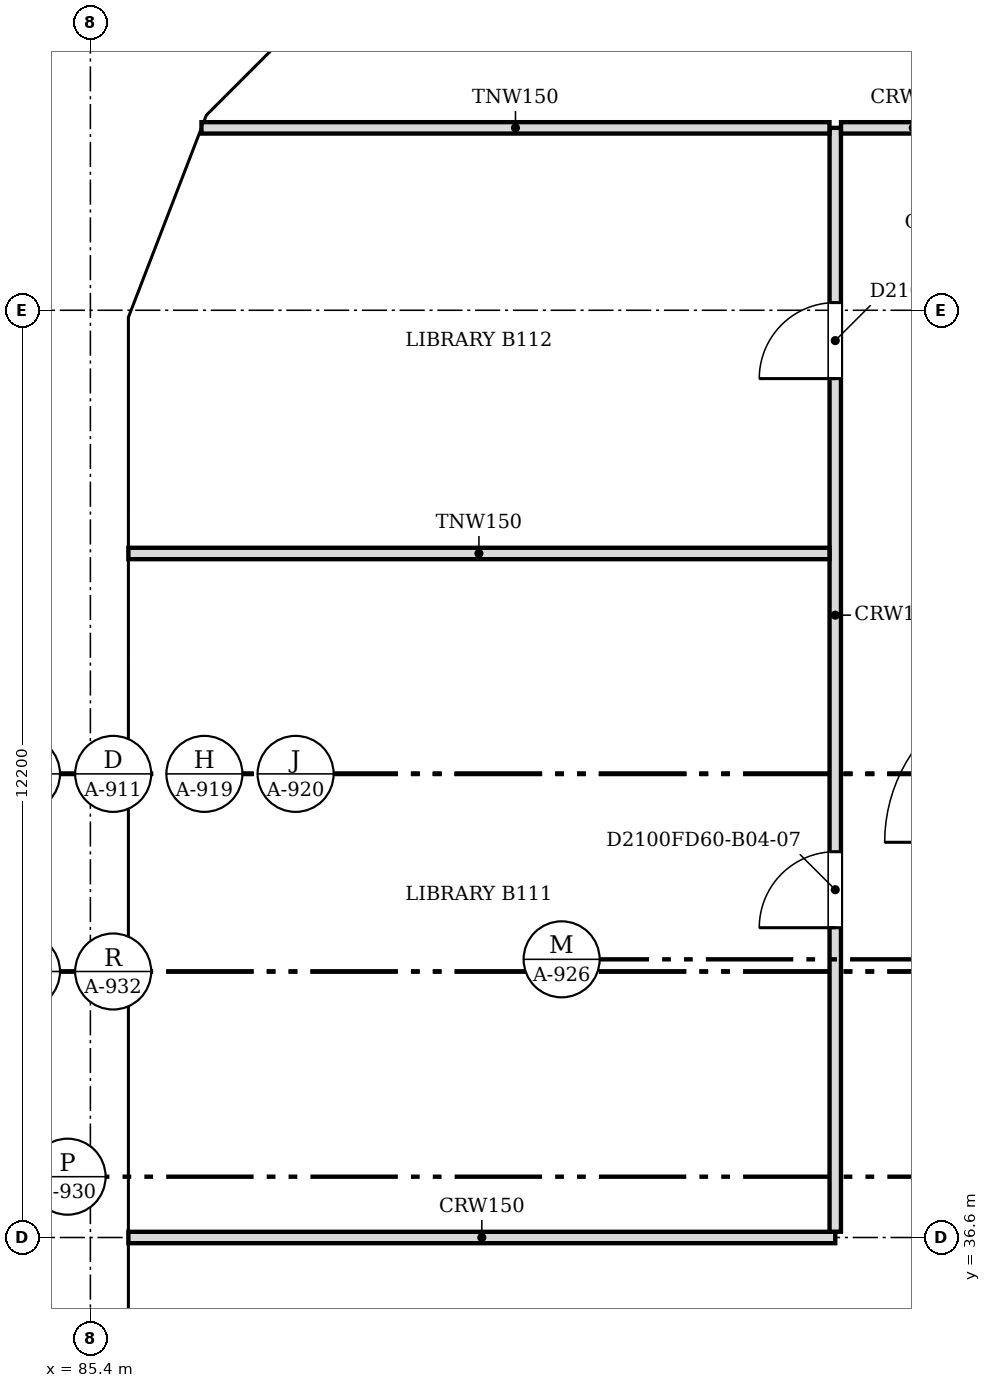
"""IFC4 building model, lengths in metres.
Left out: names, types, materials, properties, quantities, classifications, styles, units other than length and angle.
Written with IfcOpenShell. Run it as: python <this file> out.ifc"""

import sys

from ifc_helpers import new_model, si_unit, direction, frame, frame_2d, origin, place, context, subcontext, project, spatial, polyline, rectangle, outline, extrude, faceted_brep, source, transform, mapped, element, fill, save


model = new_model("IFC4")
c1 = context("Model", 3, precision=1e-05, world=origin(), true_north=direction((0.0, 1.0)))
c2 = subcontext(c1, "Body", "Model", "MODEL_VIEW")
j1 = project(units=[si_unit("LENGTHUNIT", "METRE"), si_unit("PLANEANGLEUNIT", "RADIAN")], contexts=[c1])
p1 = place(None, origin())
s1 = spatial("IfcSite", under=j1, at=p1, CompositionType="ELEMENT")
p2 = place(p1, origin())
s2 = spatial("IfcBuilding", under=s1, at=p2, CompositionType="ELEMENT")
p3 = place(p2, frame((0.0, 0.0, 41.0)))
s3 = spatial("IfcBuildingStorey", under=s2, at=p3, CompositionType="ELEMENT", Elevation=41.0)
m1 = source(origin(), c2, "Body", "Brep", [
    faceted_brep([(2.944, -0.25, 0.0), (2.997, -0.25, 0.068), (2.997, -0.25, 7.532), (2.944, -0.25, 7.6), (0.0, -0.25, 3.8), (0.053, 0.25, 3.868), (2.891, 0.25, 7.532), (2.891, 0.25, 0.068), (0.053, 0.25, 3.732), (2.944, 0.0, 0.0), (2.944, 0.0, 7.6), (0.0, 0.0, 3.8)], [[[0, 1, 2, 3, 4]], [[5, 6, 7, 8]], [[1, 0, 9]], [[10, 3, 2]], [[6, 5, 11, 4, 3, 10]], [[8, 7, 9, 0, 4, 11]], [[8, 11, 5]], [[1, 9, 7, 6, 10, 2]]]),
])
p4 = place(p3, frame((88.794, 53.588, -3.8), z_axis=(0.0, 0.0, 1.0), x_axis=(-0.707066050402, -0.707147509625, 0.0)))
e1 = element("IfcWall", 1, at=p4, inside=s3, PredefinedType="SOLIDWALL", context=c2, shape_type="MappedRepresentation", body=[
    mapped(m1, transform((0.0, 0.0, 0.0), scale=1.0)),
])
m2 = source(origin(), c2, "Body", "SweptSolid", [
    extrude(outline(polyline([(2.744, 6.934), (0.316, 3.8), (2.744, 0.666), (2.744, 6.934)])), frame((0.0, 0.26, 0.0), z_axis=(0.0, -1.0, 0.0), x_axis=(1.0, 0.0, 0.0)), (0.0, 0.0, 1.0), 0.52),
])
p5 = place(p4, origin())
e2 = element("IfcOpeningElement", 2, at=p5, cuts=e1, PredefinedType="OPENING", context=c2, shape_type="MappedRepresentation", body=[
    mapped(m2, transform((0.0, 0.0, 0.0), scale=1.0)),
])
m3 = source(origin(), c2, "Body", "Brep", [
    faceted_brep([(0.053, -0.25, 0.0), (3.003, -0.25, 3.8), (0.053, -0.25, 7.6), (0.0, -0.25, 7.532), (0.0, -0.25, 0.068), (0.106, 0.25, 7.532), (2.957, 0.25, 3.86), (2.957, 0.25, 3.74), (0.106, 0.25, 0.068), (3.003, 0.0, 3.8), (0.053, 0.0, 0.0), (0.053, 0.0, 7.6)], [[[0, 1, 2, 3, 4]], [[5, 6, 7, 8]], [[8, 7, 9, 1, 0, 10]], [[6, 5, 11, 2, 1, 9]], [[3, 2, 11]], [[10, 0, 4]], [[8, 10, 4, 3, 11, 5]], [[9, 7, 6]]]),
])
p6 = place(p3, frame((86.731, 51.556, -3.8), z_axis=(0.0, 0.0, 1.0), x_axis=(-0.359855894603, -0.933007896601, 0.0)))
e3 = element("IfcWall", 3, at=p6, inside=s3, PredefinedType="SOLIDWALL", context=c2, shape_type="MappedRepresentation", body=[
    mapped(m3, transform((0.0, 0.0, 0.0), scale=1.0)),
])
m4 = source(origin(), c2, "Body", "SweptSolid", [
    extrude(outline(polyline([(0.253, 0.665), (2.687, 3.8), (0.253, 6.935), (0.253, 0.665)])), frame((0.0, 0.26, 0.0), z_axis=(0.0, -1.0, 0.0), x_axis=(1.0, 0.0, 0.0)), (0.0, 0.0, 1.0), 0.52),
])
p7 = place(p6, origin())
e4 = element("IfcOpeningElement", 4, at=p7, cuts=e3, PredefinedType="OPENING", context=c2, shape_type="MappedRepresentation", body=[
    mapped(m4, transform((0.0, 0.0, 0.0), scale=1.0)),
])
m5 = source(origin(), c2, "Body", "Brep", [
    faceted_brep([(3.003, -0.25, 0.0), (6.053, -0.25, 3.8), (3.003, -0.25, 7.6), (0.0, -0.25, 3.8), (0.047, 0.25, 3.859), (3.003, 0.25, 7.6), (6.053, 0.25, 3.8), (3.003, 0.25, 0.0), (0.047, 0.25, 3.741), (0.0, 0.0, 3.8)], [[[0, 1, 2, 3]], [[4, 5, 6, 7, 8]], [[7, 6, 1, 0]], [[6, 5, 2, 1]], [[5, 4, 9, 3, 2]], [[8, 7, 0, 3, 9]], [[8, 9, 4]]]),
])
p8 = place(p3, frame((85.65, 48.753, -3.8), z_axis=(0.0, 0.0, 1.0), x_axis=(0.0, -1.0, 0.0)))
e5 = element("IfcWall", 5, at=p8, inside=s3, PredefinedType="SOLIDWALL", context=c2, shape_type="MappedRepresentation", body=[
    mapped(m5, transform((0.0, 0.0, 0.0), scale=1.0)),
])
m6 = source(origin(), c2, "Body", "SweptSolid", [
    extrude(outline(polyline([(3.005, 0.401), (5.733, 3.8), (3.005, 7.199), (0.319, 3.8), (3.005, 0.401)])), frame((0.0, 0.26, 0.0), z_axis=(0.0, -1.0, 0.0), x_axis=(1.0, 0.0, 0.0)), (0.0, 0.0, 1.0), 0.52),
])
p9 = place(p8, origin())
e6 = element("IfcOpeningElement", 6, at=p9, cuts=e5, PredefinedType="OPENING", context=c2, shape_type="MappedRepresentation", body=[
    mapped(m6, transform((0.0, 0.0, 0.0), scale=1.0)),
])
m7 = source(origin(), c2, "Body", "Brep", [
    faceted_brep([(3.05, -0.25, 0.0), (6.1, -0.25, 3.8), (6.1, -0.25, 3.8), (3.05, -0.25, 7.6), (0.0, -0.25, 3.8), (0.0, 0.25, 3.8), (3.05, 0.25, 7.6), (6.1, 0.25, 3.8), (6.1, 0.25, 3.8), (3.05, 0.25, 0.0)], [[[0, 1, 2, 3, 4]], [[5, 6, 7, 8, 9]], [[9, 8, 1, 0]], [[7, 6, 3, 2]], [[6, 5, 4, 3]], [[5, 9, 0, 4]], [[1, 8, 7, 2]]]),
])
p10 = place(p3, frame((85.65, 42.7, -3.8), z_axis=(0.0, 0.0, 1.0), x_axis=(0.0, -1.0, 0.0)))
e7 = element("IfcWall", 7, at=p10, inside=s3, PredefinedType="SOLIDWALL", context=c2, shape_type="MappedRepresentation", body=[
    mapped(m7, transform((0.0, 0.0, 0.0), scale=1.0)),
])
m8 = source(origin(), c2, "Body", "SweptSolid", [
    extrude(outline(polyline([(3.05, 0.399), (5.78, 3.8), (3.05, 7.201), (0.321, 3.8), (3.05, 0.399)])), frame((0.0, 0.26, 0.0), z_axis=(0.0, -1.0, 0.0), x_axis=(1.0, 0.0, 0.0)), (0.0, 0.0, 1.0), 0.52),
])
p11 = place(p10, origin())
e8 = element("IfcOpeningElement", 8, at=p11, cuts=e7, PredefinedType="OPENING", context=c2, shape_type="MappedRepresentation", body=[
    mapped(m8, transform((0.0, 0.0, 0.0), scale=1.0)),
])
m9 = source(origin(), c2, "Body", "SweptSolid", [
    extrude(outline(polyline([(3.05, 0.0), (6.1, 3.8), (3.05, 7.6), (0.0, 3.8), (3.05, 0.0)])), frame((0.0, 0.25, 0.0), z_axis=(0.0, -1.0, 0.0), x_axis=(1.0, 0.0, 0.0)), (0.0, 0.0, 1.0), 0.5),
])
p12 = place(p3, frame((85.65, 36.6, -3.8), z_axis=(0.0, 0.0, 1.0), x_axis=(0.0, -1.0, 0.0)))
e9 = element("IfcWall", 9, at=p12, inside=s3, PredefinedType="SOLIDWALL", context=c2, shape_type="MappedRepresentation", body=[
    mapped(m9, transform((0.0, 0.0, 0.0), scale=1.0)),
])
p13 = place(p12, origin())
e10 = element("IfcOpeningElement", 10, at=p13, cuts=e9, PredefinedType="OPENING", context=c2, shape_type="MappedRepresentation", body=[
    mapped(m8, transform((0.0, 0.0, 0.0), scale=1.0)),
])
p14 = place(p2, frame((0.0, 0.0, 44.8)))
s4 = spatial("IfcBuildingStorey", under=s2, at=p14, CompositionType="ELEMENT", Elevation=44.8)
m10 = source(origin(), c2, "Body", "Brep", [
    faceted_brep([(0.053, -0.25, 0.0), (2.997, -0.25, 3.8), (0.053, -0.25, 7.6), (0.0, -0.25, 7.532), (0.0, -0.25, 0.068), (0.106, 0.25, 7.532), (2.944, 0.25, 3.868), (2.944, 0.25, 3.732), (0.106, 0.25, 0.068), (2.997, 0.0, 3.8), (0.053, 0.0, 0.0), (0.053, 0.0, 7.6)], [[[0, 1, 2, 3, 4]], [[5, 6, 7, 8]], [[8, 7, 9, 1, 0, 10]], [[6, 5, 11, 2, 1, 9]], [[3, 2, 11]], [[10, 0, 4]], [[8, 10, 4, 3, 11, 5]], [[9, 7, 6]]]),
])
p15 = place(p14, frame((88.831, 53.625, -3.8), z_axis=(0.0, 0.0, 1.0), x_axis=(-0.707147509625, -0.707066050402, 0.0)))
e11 = element("IfcWall", 11, at=p15, inside=s4, PredefinedType="SOLIDWALL", context=c2, shape_type="MappedRepresentation", body=[
    mapped(m10, transform((0.0, 0.0, 0.0), scale=1.0)),
])
m11 = source(origin(), c2, "Body", "SweptSolid", [
    extrude(outline(polyline([(0.253, 0.666), (2.681, 3.8), (0.253, 6.934), (0.253, 0.666)])), frame((0.0, 0.26, 0.0), z_axis=(0.0, -1.0, 0.0), x_axis=(1.0, 0.0, 0.0)), (0.0, 0.0, 1.0), 0.52),
])
p16 = place(p15, origin())
e12 = element("IfcOpeningElement", 12, at=p16, cuts=e11, PredefinedType="OPENING", context=c2, shape_type="MappedRepresentation", body=[
    mapped(m11, transform((0.0, 0.0, 0.0), scale=1.0)),
])
m12 = source(origin(), c2, "Body", "Brep", [
    faceted_brep([(2.95, -0.25, 0.0), (2.997, -0.25, 0.059), (2.997, -0.25, 7.541), (2.95, -0.25, 7.6), (0.0, -0.25, 3.8), (0.053, 0.25, 3.868), (2.904, 0.25, 7.54), (2.904, 0.25, 0.06), (0.053, 0.25, 3.732), (2.95, 0.0, 0.0), (2.95, 0.0, 7.6), (0.0, 0.0, 3.8)], [[[0, 1, 2, 3, 4]], [[5, 6, 7, 8]], [[1, 0, 9]], [[10, 3, 2]], [[6, 5, 11, 4, 3, 10]], [[8, 7, 9, 0, 4, 11]], [[8, 11, 5]], [[1, 9, 7, 6, 10, 2]]]),
])
p17 = place(p14, frame((86.712, 51.506, -3.8), z_axis=(0.0, 0.0, 1.0), x_axis=(-0.359874094142, -0.933000876937, 0.0)))
e13 = element("IfcWall", 13, at=p17, inside=s4, PredefinedType="SOLIDWALL", context=c2, shape_type="MappedRepresentation", body=[
    mapped(m12, transform((0.0, 0.0, 0.0), scale=1.0)),
])
m13 = source(origin(), c2, "Body", "SweptSolid", [
    extrude(outline(polyline([(2.75, 6.935), (0.316, 3.8), (2.75, 0.665), (2.75, 6.935)])), frame((0.0, 0.26, 0.0), z_axis=(0.0, -1.0, 0.0), x_axis=(1.0, 0.0, 0.0)), (0.0, 0.0, 1.0), 0.52),
])
p18 = place(p17, origin())
e14 = element("IfcOpeningElement", 14, at=p18, cuts=e13, PredefinedType="OPENING", context=c2, shape_type="MappedRepresentation", body=[
    mapped(m13, transform((0.0, 0.0, 0.0), scale=1.0)),
])
m14 = source(origin(), c2, "Body", "Brep", [
    faceted_brep([(0.047, -0.25, 0.0), (3.05, -0.25, 3.8), (0.047, -0.25, 7.6), (0.0, -0.25, 7.54), (0.0, -0.25, 0.06), (0.093, 0.25, 7.541), (3.05, 0.25, 3.8), (0.093, 0.25, 0.059), (0.047, 0.0, 0.0), (0.047, 0.0, 7.6)], [[[0, 1, 2, 3, 4]], [[5, 6, 7]], [[7, 6, 1, 0, 8]], [[6, 5, 9, 2, 1]], [[3, 2, 9]], [[8, 0, 4]], [[7, 8, 4, 3, 9, 5]]]),
])
p19 = place(p14, frame((85.65, 48.8, -3.8), z_axis=(0.0, 0.0, 1.0), x_axis=(0.0, -1.0, 0.0)))
e15 = element("IfcWall", 15, at=p19, inside=s4, PredefinedType="SOLIDWALL", context=c2, shape_type="MappedRepresentation", body=[
    mapped(m14, transform((0.0, 0.0, 0.0), scale=1.0)),
])
m15 = source(origin(), c2, "Body", "SweptSolid", [
    extrude(outline(polyline([(0.247, 0.656), (2.731, 3.8), (0.247, 6.944), (0.247, 0.656)])), frame((0.0, 0.26, 0.0), z_axis=(0.0, -1.0, 0.0), x_axis=(1.0, 0.0, 0.0)), (0.0, 0.0, 1.0), 0.52),
])
p20 = place(p19, origin())
e16 = element("IfcOpeningElement", 16, at=p20, cuts=e15, PredefinedType="OPENING", context=c2, shape_type="MappedRepresentation", body=[
    mapped(m15, transform((0.0, 0.0, 0.0), scale=1.0)),
])
p21 = place(p14, frame((85.65, 45.75, -3.8), z_axis=(0.0, 0.0, 1.0), x_axis=(0.0, -1.0, 0.0)))
e17 = element("IfcWall", 17, at=p21, inside=s4, PredefinedType="SOLIDWALL", context=c2, shape_type="MappedRepresentation", body=[
    mapped(m9, transform((0.0, 0.0, 0.0), scale=1.0)),
])
p22 = place(p21, origin())
e18 = element("IfcOpeningElement", 18, at=p22, cuts=e17, PredefinedType="OPENING", context=c2, shape_type="MappedRepresentation", body=[
    mapped(m8, transform((0.0, 0.0, 0.0), scale=1.0)),
])
p23 = place(p14, frame((85.65, 39.65, -3.8), z_axis=(0.0, 0.0, 1.0), x_axis=(0.0, -1.0, 0.0)))
e19 = element("IfcWall", 19, at=p23, inside=s4, PredefinedType="SOLIDWALL", context=c2, shape_type="MappedRepresentation", body=[
    mapped(m7, transform((0.0, 0.0, 0.0), scale=1.0)),
])
p24 = place(p23, origin())
e20 = element("IfcOpeningElement", 20, at=p24, cuts=e19, PredefinedType="OPENING", context=c2, shape_type="MappedRepresentation", body=[
    mapped(m8, transform((0.0, 0.0, 0.0), scale=1.0)),
])
p25 = place(p3, frame((85.9, 36.6, 0.0), z_axis=(0.0, 0.0, 1.0), x_axis=(1.0, 0.0, 0.0)))
e21 = element("IfcWall", 21, at=p25, inside=s3, PredefinedType="PARTITIONING", context=c2, shape_type="SweptSolid", body=[
    extrude(rectangle(XDim=9.3, YDim=0.15, at=frame_2d((4.65, 0.0))), origin(), (0.0, 0.0, 1.0), 3.067),
])
p26 = place(p3, frame((95.2, 36.676, 0.0), z_axis=(0.0, 0.0, 1.0), x_axis=(0.0, 1.0, 0.0)))
e22 = element("IfcWall", 22, at=p26, inside=s3, PredefinedType="PARTITIONING", context=c2, shape_type="SweptSolid", body=[
    extrude(rectangle(XDim=14.524, YDim=0.15, at=frame_2d((7.262, 0.0))), origin(), (0.0, 0.0, 1.0), 3.067),
])
m16 = source(origin(), c2, "Body", "SweptSolid", [
    extrude(rectangle(XDim=1.0, YDim=2.1, at=frame_2d((0.5, 1.05))), frame((0.0, 0.085, 0.0), z_axis=(0.0, -1.0, 0.0), x_axis=(1.0, 0.0, 0.0)), (0.0, 0.0, 1.0), 0.17),
])
p27 = place(p26, frame((11.225, 0.0, 0.0)))
e23 = element("IfcOpeningElement", 23, at=p27, cuts=e22, PredefinedType="OPENING", context=c2, shape_type="MappedRepresentation", body=[
    mapped(m16, transform((0.0, 0.0, 0.0), scale=1.0)),
])
p28 = place(p26, frame((4.0, 0.0, 0.0)))
e24 = element("IfcOpeningElement", 24, at=p28, cuts=e22, PredefinedType="OPENING", context=c2, shape_type="MappedRepresentation", body=[
    mapped(m16, transform((0.0, 0.0, 0.0), scale=1.0)),
])
p29 = place(p3, frame((85.9, 45.6, 0.0), z_axis=(0.0, 0.0, 1.0), x_axis=(1.0, 0.0, 0.0)))
e25 = element("IfcWall", 25, at=p29, inside=s3, PredefinedType="PARTITIONING", context=c2, shape_type="SweptSolid", body=[
    extrude(rectangle(XDim=9.224, YDim=0.15, at=frame_2d((4.612, 0.0))), origin(), (0.0, 0.0, 1.0), 3.067),
])
p30 = place(p3, frame((86.862, 51.2, 0.0), z_axis=(0.0, 0.0, 1.0), x_axis=(1.0, 0.0, 0.0)))
e26 = element("IfcWall", 26, at=p30, inside=s3, PredefinedType="PARTITIONING", context=c2, shape_type="SweptSolid", body=[
    extrude(rectangle(XDim=8.262, YDim=0.15, at=frame_2d((4.131, 0.0))), origin(), (0.0, 0.0, 1.0), 3.067),
])
p31 = place(p3, frame((95.276, 51.2, 0.0), z_axis=(0.0, 0.0, 1.0), x_axis=(1.0, 0.0, 0.0)))
e27 = element("IfcWall", 27, at=p31, inside=s3, PredefinedType="PARTITIONING", context=c2, shape_type="SweptSolid", body=[
    extrude(rectangle(XDim=4.724, YDim=0.15, at=frame_2d((2.362, 0.0))), origin(), (0.0, 0.0, 1.0), 3.067),
])
p32 = place(p31, frame((1.9, 0.0, 0.0)))
e28 = element("IfcOpeningElement", 28, at=p32, cuts=e27, PredefinedType="OPENING", context=c2, shape_type="MappedRepresentation", body=[
    mapped(m16, transform((0.0, 0.0, 0.0), scale=1.0)),
])
m17 = source(origin(), c2, "Body", "SweptSolid", [
    extrude(rectangle(XDim=1.0, YDim=2.1, at=frame_2d((0.5, 1.05))), frame((0.0, 0.025, 0.0), z_axis=(0.0, -1.0, 0.0), x_axis=(1.0, 0.0, 0.0)), (0.0, 0.0, 1.0), 0.05),
])
p33 = place(p27, origin())
e29 = element("IfcDoor", 29, at=p33, inside=s3, OperationType="SINGLE_SWING_LEFT", PredefinedType="DOOR", context=c2, shape_type="MappedRepresentation", body=[
    mapped(m17, transform((0.0, 0.0, 0.0), scale=1.0)),
])
fill(e23, e29)
p34 = place(p28, origin())
e30 = element("IfcDoor", 30, at=p34, inside=s3, OperationType="SINGLE_SWING_LEFT", PredefinedType="DOOR", context=c2, shape_type="MappedRepresentation", body=[
    mapped(m17, transform((0.0, 0.0, 0.0), scale=1.0)),
])
fill(e24, e30)
save(model, sys.argv[1])
